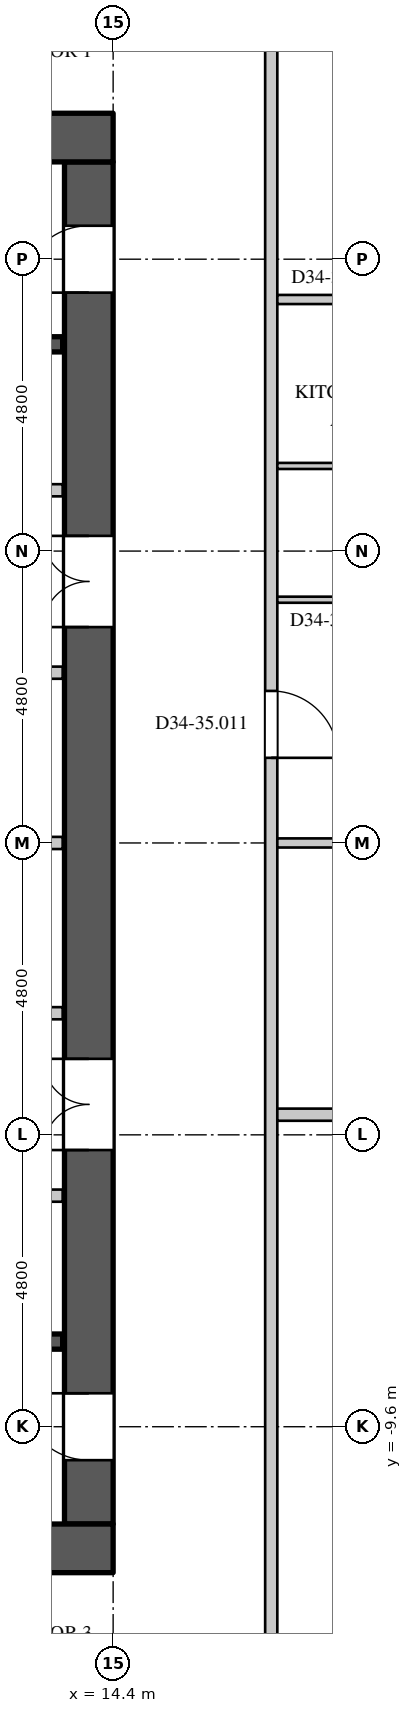
"""IFC4 building model, lengths in metres.
Left out: names, types, materials, properties, quantities, classifications, styles, units other than length and angle.
Written with IfcOpenShell. Run it as: python <this file> out.ifc"""

import sys

from ifc_helpers import new_model, si_unit, direction, frame, frame_2d, origin, place, context, subcontext, project, spatial, rectangle, extrude, element, fill, save


model = new_model("IFC4")
c1 = context("Model", 3, precision=1e-05, world=origin(), true_north=direction((0.0, 1.0)))
c2 = subcontext(c1, "Body", "Model", "MODEL_VIEW")
j1 = project(units=[si_unit("LENGTHUNIT", "METRE"), si_unit("PLANEANGLEUNIT", "RADIAN")], contexts=[c1])
p1 = place(None, origin())
s1 = spatial("IfcSite", under=j1, at=p1, CompositionType="ELEMENT")
p2 = place(p1, origin())
s2 = spatial("IfcBuilding", under=s1, at=p2, CompositionType="ELEMENT")
p3 = place(p2, frame((0.0, 0.0, 148.5)))
s3 = spatial("IfcBuildingStorey", under=s2, at=p3, CompositionType="ELEMENT", Elevation=148.5)
for number, where, z_axis, x_axis in (
    (1, (-14.4, 11.6, 0.0), (0.0, 0.0, 1.0), (1.0, 0.0, 0.0)),
    (2, (-14.4, -11.6, 0.0), (0.0, 0.0, 1.0), (1.0, 0.0, 0.0)),
):
    element("IfcWall", number, at=place(p3, frame(where, z_axis=z_axis, x_axis=x_axis)), inside=s3, PredefinedType="SHEAR", context=c2, shape_type="SweptSolid", body=[
        extrude(rectangle(XDim=28.8, YDim=0.8, at=frame_2d((14.4, 0.0))), origin(), (0.0, 0.0, 1.0), 4.2),
    ])
p4 = place(p3, frame((14.0, -11.2, 0.0), z_axis=(0.0, 0.0, 1.0), x_axis=(0.0, 1.0, 0.0)))
e3 = element("IfcWall", 3, at=p4, inside=s3, PredefinedType="SHEAR", context=c2, shape_type="SweptSolid", body=[
    extrude(rectangle(XDim=22.4, YDim=0.8, at=frame_2d((11.2, 0.0))), origin(), (0.0, 0.0, 1.0), 4.2),
])
p5 = place(p4, frame((20.25, 0.0, 0.0)))
e4 = element("IfcOpeningElement", 4, at=p5, cuts=e3, PredefinedType="OPENING", context=c2, shape_type="SweptSolid", body=[
    extrude(rectangle(XDim=1.1, YDim=2.2, at=frame_2d((0.55, 1.1))), frame((0.0, 0.41, 0.0), z_axis=(0.0, -1.0, 0.0), x_axis=(1.0, 0.0, 0.0)), (0.0, 0.0, 1.0), 0.82),
])
p6 = place(p4, frame((1.05, 0.0, 0.0)))
e5 = element("IfcOpeningElement", 5, at=p6, cuts=e3, PredefinedType="OPENING", context=c2, shape_type="SweptSolid", body=[
    extrude(rectangle(XDim=1.1, YDim=2.2, at=frame_2d((0.55, 1.1))), frame((0.0, 0.41, 0.0), z_axis=(0.0, -1.0, 0.0), x_axis=(1.0, 0.0, 0.0)), (0.0, 0.0, 1.0), 0.82),
])
p7 = place(p4, frame((14.75, 0.0, 0.0)))
e6 = element("IfcOpeningElement", 6, at=p7, cuts=e3, PredefinedType="OPENING", context=c2, shape_type="SweptSolid", body=[
    extrude(rectangle(XDim=1.5, YDim=2.4, at=frame_2d((0.75, 1.2))), frame((0.0, 0.41, 0.0), z_axis=(0.0, -1.0, 0.0), x_axis=(1.0, 0.0, 0.0)), (0.0, 0.0, 1.0), 0.82),
])
p8 = place(p4, frame((6.15, 0.0, 0.0)))
e7 = element("IfcOpeningElement", 7, at=p8, cuts=e3, PredefinedType="OPENING", context=c2, shape_type="SweptSolid", body=[
    extrude(rectangle(XDim=1.5, YDim=2.4, at=frame_2d((0.75, 1.2))), frame((0.0, 0.41, 0.0), z_axis=(0.0, -1.0, 0.0), x_axis=(1.0, 0.0, 0.0)), (0.0, 0.0, 1.0), 0.82),
])
p9 = place(p3, frame((0.78, 5.8, 0.0), z_axis=(0.0, 0.0, 1.0), x_axis=(1.0, 0.0, 0.0)))
e8 = element("IfcWall", 8, at=p9, inside=s3, PredefinedType="PARTITIONING", context=c2, shape_type="SweptSolid", body=[
    extrude(rectangle(XDim=12.79, YDim=0.2, at=frame_2d((6.395, 0.0))), origin(), (0.0, 0.0, 1.0), 3.798),
])
p10 = place(p9, frame((3.15, 0.0, 0.0)))
e9 = element("IfcOpeningElement", 9, at=p10, cuts=e8, PredefinedType="OPENING", context=c2, shape_type="SweptSolid", body=[
    extrude(rectangle(XDim=0.9, YDim=2.2, at=frame_2d((0.45, 1.1))), frame((0.0, 0.11, 0.0), z_axis=(0.0, -1.0, 0.0), x_axis=(1.0, 0.0, 0.0)), (0.0, 0.0, 1.0), 0.22),
])
p11 = place(p9, frame((9.35, 0.0, 0.0)))
e10 = element("IfcOpeningElement", 10, at=p11, cuts=e8, PredefinedType="OPENING", context=c2, shape_type="SweptSolid", body=[
    extrude(rectangle(XDim=0.9, YDim=2.2, at=frame_2d((0.45, 1.1))), frame((0.0, 0.11, 0.0), z_axis=(0.0, -1.0, 0.0), x_axis=(1.0, 0.0, 0.0)), (0.0, 0.0, 1.0), 0.22),
])
p12 = place(p3, frame((4.02, -5.8, 0.0), z_axis=(0.0, 0.0, 1.0), x_axis=(1.0, 0.0, 0.0)))
e11 = element("IfcWall", 11, at=p12, inside=s3, PredefinedType="PARTITIONING", context=c2, shape_type="SweptSolid", body=[
    extrude(rectangle(XDim=9.55, YDim=0.2, at=frame_2d((4.775, 0.0))), origin(), (0.0, 0.0, 1.0), 3.798),
])
p13 = place(p12, frame((4.3, 0.0, 0.0)))
e12 = element("IfcOpeningElement", 12, at=p13, cuts=e11, PredefinedType="OPENING", context=c2, shape_type="SweptSolid", body=[
    extrude(rectangle(XDim=0.9, YDim=2.2, at=frame_2d((0.45, 1.1))), frame((0.0, 0.11, 0.0), z_axis=(0.0, -1.0, 0.0), x_axis=(1.0, 0.0, 0.0)), (0.0, 0.0, 1.0), 0.22),
])
p14 = place(p3, frame((17.0, -14.5, 0.0), z_axis=(0.0, 0.0, 1.0), x_axis=(0.0, 1.0, 0.0)))
e13 = element("IfcWall", 13, at=p14, inside=s3, PredefinedType="PARTITIONING", context=c2, shape_type="SweptSolid", body=[
    extrude(rectangle(XDim=29.0, YDim=0.2, at=frame_2d((14.5, 0.0))), origin(), (0.0, 0.0, 1.0), 3.798),
])
p15 = place(p14, frame((15.9, 0.0, 0.0)))
e14 = element("IfcOpeningElement", 14, at=p15, cuts=e13, PredefinedType="OPENING", context=c2, shape_type="SweptSolid", body=[
    extrude(rectangle(XDim=1.1, YDim=2.4, at=frame_2d((0.55, 1.2))), frame((0.0, 0.11, 0.0), z_axis=(0.0, -1.0, 0.0), x_axis=(1.0, 0.0, 0.0)), (0.0, 0.0, 1.0), 0.22),
])
p16 = place(p3, frame((15.099, -17.636, 0.0), z_axis=(0.0, 0.0, 1.0), x_axis=(0.707106781187, 0.707106781187, 0.0)))
e15 = element("IfcWall", 15, at=p16, inside=s3, PredefinedType="PARTITIONING", context=c2, shape_type="SweptSolid", body=[
    extrude(rectangle(XDim=8.986, YDim=0.15, at=frame_2d((4.493, 0.0))), origin(), (0.0, 0.0, 1.0), 3.798),
])
p17 = place(p16, frame((0.4, 0.0, 0.0)))
e16 = element("IfcOpeningElement", 16, at=p17, cuts=e15, PredefinedType="OPENING", context=c2, shape_type="SweptSolid", body=[
    extrude(rectangle(XDim=0.95, YDim=2.2, at=frame_2d((0.475, 1.1))), frame((0.0, 0.085, 0.0), z_axis=(0.0, -1.0, 0.0), x_axis=(1.0, 0.0, 0.0)), (0.0, 0.0, 1.0), 0.17),
])
p18 = place(p16, frame((5.1, 0.0, 0.0)))
e17 = element("IfcOpeningElement", 17, at=p18, cuts=e15, PredefinedType="OPENING", context=c2, shape_type="SweptSolid", body=[
    extrude(rectangle(XDim=0.95, YDim=2.2, at=frame_2d((0.475, 1.1))), frame((0.0, 0.085, 0.0), z_axis=(0.0, -1.0, 0.0), x_axis=(1.0, 0.0, 0.0)), (0.0, 0.0, 1.0), 0.17),
])
p19 = place(p16, frame((7.85, 0.0, 0.0)))
e18 = element("IfcOpeningElement", 18, at=p19, cuts=e15, PredefinedType="OPENING", context=c2, shape_type="SweptSolid", body=[
    extrude(rectangle(XDim=0.95, YDim=2.2, at=frame_2d((0.475, 1.1))), frame((0.0, 0.085, 0.0), z_axis=(0.0, -1.0, 0.0), x_axis=(1.0, 0.0, 0.0)), (0.0, 0.0, 1.0), 0.17),
])
p20 = place(p3, frame((16.367, 16.367, 0.0), z_axis=(0.0, 0.0, 1.0), x_axis=(0.707106781187, -0.707106781187, 0.0)))
e19 = element("IfcWall", 19, at=p20, inside=s3, PredefinedType="PARTITIONING", context=c2, shape_type="SweptSolid", body=[
    extrude(rectangle(XDim=7.192, YDim=0.15, at=frame_2d((3.596, 0.0))), origin(), (0.0, 0.0, 1.0), 3.798),
])
p21 = place(p20, frame((6.05, 0.0, 0.0)))
e20 = element("IfcOpeningElement", 20, at=p21, cuts=e19, PredefinedType="OPENING", context=c2, shape_type="SweptSolid", body=[
    extrude(rectangle(XDim=0.95, YDim=2.2, at=frame_2d((0.475, 1.1))), frame((0.0, 0.085, 0.0), z_axis=(0.0, -1.0, 0.0), x_axis=(1.0, 0.0, 0.0)), (0.0, 0.0, 1.0), 0.17),
])
p22 = place(p20, frame((3.35, 0.0, 0.0)))
e21 = element("IfcOpeningElement", 21, at=p22, cuts=e19, PredefinedType="OPENING", context=c2, shape_type="SweptSolid", body=[
    extrude(rectangle(XDim=0.95, YDim=2.2, at=frame_2d((0.475, 1.1))), frame((0.0, 0.085, 0.0), z_axis=(0.0, -1.0, 0.0), x_axis=(1.0, 0.0, 0.0)), (0.0, 0.0, 1.0), 0.17),
])
p23 = place(p3, frame((17.1, 0.0, 0.0), z_axis=(0.0, 0.0, 1.0), x_axis=(1.0, 0.0, 0.0)))
e22 = element("IfcWall", 22, at=p23, inside=s3, PredefinedType="PARTITIONING", context=c2, shape_type="SweptSolid", body=[
    extrude(rectangle(XDim=9.355, YDim=0.15, at=frame_2d((4.677, 0.0))), origin(), (0.0, 0.0, 1.0), 3.798),
])
p24 = place(p23, frame((1.85, 0.0, 0.0)))
e23 = element("IfcOpeningElement", 23, at=p24, cuts=e22, PredefinedType="OPENING", context=c2, shape_type="SweptSolid", body=[
    extrude(rectangle(XDim=0.95, YDim=2.2, at=frame_2d((0.475, 1.1))), frame((0.0, 0.085, 0.0), z_axis=(0.0, -1.0, 0.0), x_axis=(1.0, 0.0, 0.0)), (0.0, 0.0, 1.0), 0.17),
])
p25 = place(p3, frame((17.1, 8.937, 0.0), z_axis=(0.0, 0.0, 1.0), x_axis=(1.0, 0.0, 0.0)))
e24 = element("IfcWall", 24, at=p25, inside=s3, PredefinedType="PARTITIONING", context=c2, shape_type="SweptSolid", body=[
    extrude(rectangle(XDim=9.355, YDim=0.15, at=frame_2d((4.677, 0.0))), origin(), (0.0, 0.0, 1.0), 3.798),
])
p26 = place(p25, frame((6.05, 0.0, 0.0)))
e25 = element("IfcOpeningElement", 25, at=p26, cuts=e24, PredefinedType="OPENING", context=c2, shape_type="SweptSolid", body=[
    extrude(rectangle(XDim=1.5, YDim=2.2, at=frame_2d((0.75, 1.1))), frame((0.0, 0.085, 0.0), z_axis=(0.0, -1.0, 0.0), x_axis=(1.0, 0.0, 0.0)), (0.0, 0.0, 1.0), 0.17),
])
p27 = place(p25, frame((1.85, 0.0, 0.0)))
e26 = element("IfcOpeningElement", 26, at=p27, cuts=e24, PredefinedType="OPENING", context=c2, shape_type="SweptSolid", body=[
    extrude(rectangle(XDim=0.95, YDim=2.2, at=frame_2d((0.475, 1.1))), frame((0.0, 0.085, 0.0), z_axis=(0.0, -1.0, 0.0), x_axis=(1.0, 0.0, 0.0)), (0.0, 0.0, 1.0), 0.17),
])
p28 = place(p3, frame((17.1, -4.469, 0.0), z_axis=(0.0, 0.0, 1.0), x_axis=(1.0, 0.0, 0.0)))
e27 = element("IfcWall", 27, at=p28, inside=s3, PredefinedType="PARTITIONING", context=c2, shape_type="SweptSolid", body=[
    extrude(rectangle(XDim=8.55, YDim=0.2, at=frame_2d((4.275, 0.0))), origin(), (0.0, 0.0, 1.0), 3.15),
])
p29 = place(p3, frame((10.38, -2.8, 0.0), z_axis=(0.0, 0.0, 1.0), x_axis=(1.0, 0.0, 0.0)))
e28 = element("IfcWall", 28, at=p29, inside=s3, PredefinedType="PARTITIONING", context=c2, shape_type="SweptSolid", body=[
    extrude(rectangle(XDim=3.19, YDim=0.2, at=frame_2d((1.595, 0.0))), origin(), (0.0, 0.0, 1.0), 3.798),
])
p30 = place(p29, frame((1.1, 0.0, 0.0)))
e29 = element("IfcOpeningElement", 29, at=p30, cuts=e28, PredefinedType="OPENING", context=c2, shape_type="SweptSolid", body=[
    extrude(rectangle(XDim=0.9, YDim=2.2, at=frame_2d((0.45, 1.1))), frame((0.0, 0.11, 0.0), z_axis=(0.0, -1.0, 0.0), x_axis=(1.0, 0.0, 0.0)), (0.0, 0.0, 1.0), 0.22),
])
p31 = place(p3, frame((10.4, 2.8, 0.0), z_axis=(0.0, 0.0, 1.0), x_axis=(1.0, 0.0, 0.0)))
e30 = element("IfcWall", 30, at=p31, inside=s3, PredefinedType="PARTITIONING", context=c2, shape_type="SweptSolid", body=[
    extrude(rectangle(XDim=3.17, YDim=0.2, at=frame_2d((1.585, 0.0))), origin(), (0.0, 0.0, 1.0), 3.798),
])
p32 = place(p31, frame((1.25, 0.0, 0.0)))
e31 = element("IfcOpeningElement", 31, at=p32, cuts=e30, PredefinedType="OPENING", context=c2, shape_type="SweptSolid", body=[
    extrude(rectangle(XDim=0.6, YDim=2.0, at=frame_2d((0.3, 1.0))), frame((0.0, 0.11, 0.0), z_axis=(0.0, -1.0, 0.0), x_axis=(1.0, 0.0, 0.0)), (0.0, 0.0, 1.0), 0.22),
])
p33 = place(p3, frame((10.4, 0.0, 0.0), z_axis=(0.0, 0.0, 1.0), x_axis=(1.0, 0.0, 0.0)))
e32 = element("IfcWall", 32, at=p33, inside=s3, PredefinedType="PARTITIONING", context=c2, shape_type="SweptSolid", body=[
    extrude(rectangle(XDim=3.17, YDim=0.2, at=frame_2d((1.585, 0.0))), origin(), (0.0, 0.0, 1.0), 3.798),
])
for number, where, z_axis, x_axis in (
    (33, (5.275, -8.2, 0.0), (0.0, 0.0, 1.0), (1.0, 0.0, 0.0)),
    (34, (5.275, 8.2, 0.0), (0.0, 0.0, 1.0), (1.0, 0.0, 0.0)),
):
    element("IfcWall", number, at=place(p3, frame(where, z_axis=z_axis, x_axis=x_axis)), inside=s3, PredefinedType="SHEAR", context=c2, shape_type="SweptSolid", body=[
        extrude(rectangle(XDim=8.295, YDim=0.25, at=frame_2d((4.147, 0.0))), origin(), (0.0, 0.0, 1.0), 3.798),
    ])
p34 = place(p3, frame((17.1, 4.0, 0.0), z_axis=(0.0, 0.0, 1.0), x_axis=(1.0, 0.0, 0.0)))
e35 = element("IfcWall", 35, at=p34, inside=s3, PredefinedType="PARTITIONING", context=c2, shape_type="SweptSolid", body=[
    extrude(rectangle(XDim=3.65, YDim=0.1, at=frame_2d((1.825, 0.0))), origin(), (0.0, 0.0, 1.0), 3.798),
])
p35 = place(p34, frame((1.85, 0.0, 0.0)))
e36 = element("IfcOpeningElement", 36, at=p35, cuts=e35, PredefinedType="OPENING", context=c2, shape_type="SweptSolid", body=[
    extrude(rectangle(XDim=0.9, YDim=2.2, at=frame_2d((0.45, 1.1))), frame((0.0, 0.06, 0.0), z_axis=(0.0, -1.0, 0.0), x_axis=(1.0, 0.0, 0.0)), (0.0, 0.0, 1.0), 0.12),
])
p36 = place(p3, frame((17.1, 6.2, 0.0), z_axis=(0.0, 0.0, 1.0), x_axis=(1.0, 0.0, 0.0)))
e37 = element("IfcWall", 37, at=p36, inside=s3, PredefinedType="PARTITIONING", context=c2, shape_type="SweptSolid", body=[
    extrude(rectangle(XDim=3.625, YDim=0.1, at=frame_2d((1.812, 0.0))), origin(), (0.0, 0.0, 1.0), 3.798),
])
p37 = place(p5, origin())
e38 = element("IfcDoor", 38, at=p37, inside=s3, OperationType="SINGLE_SWING_LEFT", PredefinedType="DOOR", context=c2, shape_type="SweptSolid", body=[
    extrude(rectangle(XDim=1.1, YDim=2.2, at=frame_2d((0.55, 1.1))), frame((0.0, 0.395, 0.0), z_axis=(0.0, -1.0, 0.0), x_axis=(1.0, 0.0, 0.0)), (0.0, 0.0, 1.0), 0.05),
])
fill(e4, e38)
p38 = place(p6, origin())
e39 = element("IfcDoor", 39, at=p38, inside=s3, OperationType="SINGLE_SWING_RIGHT", PredefinedType="DOOR", context=c2, shape_type="SweptSolid", body=[
    extrude(rectangle(XDim=1.1, YDim=2.2, at=frame_2d((0.55, 1.1))), frame((0.0, 0.395, 0.0), z_axis=(0.0, -1.0, 0.0), x_axis=(1.0, 0.0, 0.0)), (0.0, 0.0, 1.0), 0.05),
])
fill(e5, e39)
p39 = place(p7, origin())
e40 = element("IfcDoor", 40, at=p39, inside=s3, OperationType="DOUBLE_DOOR_SINGLE_SWING", PredefinedType="DOOR", context=c2, shape_type="SweptSolid", body=[
    extrude(rectangle(XDim=1.5, YDim=2.4, at=frame_2d((0.75, 1.2))), frame((0.0, 0.395, 0.0), z_axis=(0.0, -1.0, 0.0), x_axis=(1.0, 0.0, 0.0)), (0.0, 0.0, 1.0), 0.05),
])
fill(e6, e40)
p40 = place(p8, origin())
e41 = element("IfcDoor", 41, at=p40, inside=s3, OperationType="DOUBLE_DOOR_SINGLE_SWING", PredefinedType="DOOR", context=c2, shape_type="SweptSolid", body=[
    extrude(rectangle(XDim=1.5, YDim=2.4, at=frame_2d((0.75, 1.2))), frame((0.0, 0.395, 0.0), z_axis=(0.0, -1.0, 0.0), x_axis=(1.0, 0.0, 0.0)), (0.0, 0.0, 1.0), 0.05),
])
fill(e7, e41)
p41 = place(p15, origin())
e42 = element("IfcDoor", 42, at=p41, inside=s3, OperationType="SINGLE_SWING_RIGHT", PredefinedType="DOOR", context=c2, shape_type="SweptSolid", body=[
    extrude(rectangle(XDim=1.1, YDim=2.4, at=frame_2d((0.55, 1.2))), frame((0.0, 0.025, 0.0), z_axis=(0.0, -1.0, 0.0), x_axis=(1.0, 0.0, 0.0)), (0.0, 0.0, 1.0), 0.05),
])
fill(e14, e42)
save(model, sys.argv[1])
